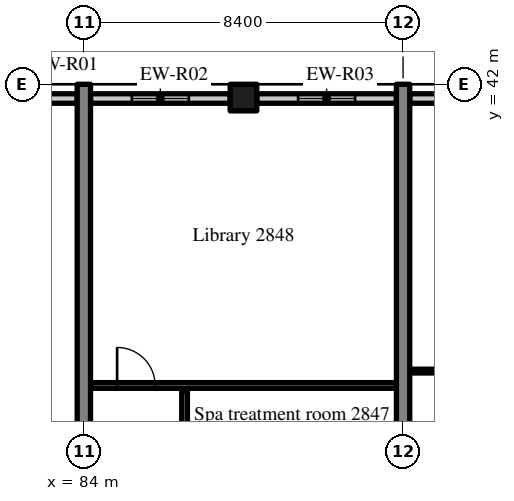
"""IFC4 building model, lengths in metres.
Left out: names, types, materials, properties, quantities, classifications, styles, units other than length and angle.
Written with IfcOpenShell. Run it as: python <this file> out.ifc"""

import sys

from ifc_helpers import new_model, si_unit, direction, frame, frame_2d, origin, origin_2d, place, context, subcontext, project, spatial, rectangle, extrude, source, transform, mapped, element, fill, save


model = new_model("IFC4")
c1 = context("Model", 3, precision=1e-05, world=origin(), true_north=direction((0.0, 1.0)))
c2 = subcontext(c1, "Body", "Model", "MODEL_VIEW")
j1 = project(units=[si_unit("LENGTHUNIT", "METRE"), si_unit("PLANEANGLEUNIT", "RADIAN")], contexts=[c1])
p1 = place(None, origin())
s1 = spatial("IfcSite", under=j1, at=p1, CompositionType="ELEMENT")
p2 = place(p1, origin())
s2 = spatial("IfcBuilding", under=s1, at=p2, CompositionType="ELEMENT")
p3 = place(p2, frame((0.0, 0.0, 118.0)))
s3 = spatial("IfcBuildingStorey", under=s2, at=p3, CompositionType="ELEMENT", Elevation=118.0)
m1 = source(origin(), c2, "Body", "SweptSolid", [
    extrude(rectangle(XDim=20.0, YDim=0.35, at=frame_2d((10.0, 0.0))), origin(), (0.0, 0.0, 1.0), 3.52),
])
for number, where, z_axis, x_axis in (
    (1, (84.0, 22.0, 0.0), (0.0, 0.0, 1.0), (0.0, 1.0, 0.0)),
    (2, (92.4, 22.0, 0.0), (0.0, 0.0, 1.0), (0.0, 1.0, 0.0)),
):
    element("IfcWall", number, at=place(p3, frame(where, z_axis=z_axis, x_axis=x_axis)), inside=s3, PredefinedType="SHEAR", context=c2, shape_type="MappedRepresentation", body=[
        mapped(m1, transform((0.0, 0.0, 0.0), scale=1.0)),
    ])
m2 = source(origin(), c2, "Body", "SweptSolid", [
    extrude(rectangle(XDim=0.7, YDim=0.7, at=origin_2d()), origin(), (0.0, 0.0, 1.0), 3.52),
])
p4 = place(p3, frame((88.2, 41.65, 0.0), z_axis=(0.0, 0.0, 1.0), x_axis=(1.0, 0.0, 0.0)))
e3 = element("IfcColumn", 3, at=p4, inside=s3, PredefinedType="COLUMN", context=c2, shape_type="MappedRepresentation", body=[
    mapped(m2, transform((0.0, 0.0, 0.0), scale=1.0)),
])
m3 = source(origin(), c2, "Body", "SweptSolid", [
    extrude(rectangle(XDim=1.683, YDim=0.25, at=frame_2d((0.841, 0.0))), origin(), (0.0, 0.0, 1.0), 2.82),
])
p5 = place(p3, frame((83.825, 41.625, 0.0), z_axis=(0.0, 0.0, 1.0), x_axis=(-1.0, 0.0, 0.0)))
e4 = element("IfcWall", 4, at=p5, inside=s3, PredefinedType="SOLIDWALL", context=c2, shape_type="MappedRepresentation", body=[
    mapped(m3, transform((0.0, 0.0, 0.0), scale=1.0)),
])
m4 = source(origin(), c2, "Body", "SweptSolid", [
    extrude(rectangle(XDim=3.675, YDim=0.25, at=frame_2d((1.837, 0.0))), origin(), (0.0, 0.0, 1.0), 2.82),
])
p6 = place(p3, frame((87.85, 41.625, 0.0), z_axis=(0.0, 0.0, 1.0), x_axis=(-1.0, 0.0, 0.0)))
e5 = element("IfcWall", 5, at=p6, inside=s3, PredefinedType="SOLIDWALL", context=c2, shape_type="MappedRepresentation", body=[
    mapped(m4, transform((0.0, 0.0, 0.0), scale=1.0)),
])
m5 = source(origin(), c2, "Body", "SweptSolid", [
    extrude(rectangle(XDim=1.5, YDim=1.5, at=frame_2d((0.75, 0.75))), frame((0.0, 0.135, 0.0), z_axis=(0.0, -1.0, 0.0), x_axis=(1.0, 0.0, 0.0)), (0.0, 0.0, 1.0), 0.27),
])
p7 = place(p6, frame((1.087, 0.0, 0.9)))
e6 = element("IfcOpeningElement", 6, at=p7, cuts=e5, PredefinedType="OPENING", context=c2, shape_type="MappedRepresentation", body=[
    mapped(m5, transform((0.0, 0.0, 0.0), scale=1.0)),
])
p8 = place(p3, frame((92.225, 41.625, 0.0), z_axis=(0.0, 0.0, 1.0), x_axis=(-1.0, 0.0, 0.0)))
e7 = element("IfcWall", 7, at=p8, inside=s3, PredefinedType="SOLIDWALL", context=c2, shape_type="MappedRepresentation", body=[
    mapped(m4, transform((0.0, 0.0, 0.0), scale=1.0)),
])
p9 = place(p8, frame((1.087, 0.0, 0.9)))
e8 = element("IfcOpeningElement", 8, at=p9, cuts=e7, PredefinedType="OPENING", context=c2, shape_type="MappedRepresentation", body=[
    mapped(m5, transform((0.0, 0.0, 0.0), scale=1.0)),
])
m6 = source(origin(), c2, "Body", "SweptSolid", [
    extrude(rectangle(XDim=4.07, YDim=0.25, at=frame_2d((2.035, 0.0))), origin(), (0.0, 0.0, 1.0), 2.82),
])
p10 = place(p3, frame((96.645, 41.625, 0.0), z_axis=(0.0, 0.0, 1.0), x_axis=(-1.0, 0.0, 0.0)))
e9 = element("IfcWall", 9, at=p10, inside=s3, PredefinedType="SOLIDWALL", context=c2, shape_type="MappedRepresentation", body=[
    mapped(m6, transform((0.0, 0.0, 0.0), scale=1.0)),
])
p11 = place(p10, frame((1.285, 0.0, 0.9)))
e10 = element("IfcOpeningElement", 10, at=p11, cuts=e9, PredefinedType="OPENING", context=c2, shape_type="MappedRepresentation", body=[
    mapped(m5, transform((0.0, 0.0, 0.0), scale=1.0)),
])
m7 = source(origin(), c2, "Body", "SweptSolid", [
    extrude(rectangle(XDim=4.45, YDim=0.15, at=frame_2d((2.225, 0.0))), origin(), (0.0, 0.0, 1.0), 3.52),
])
p12 = place(p3, frame((86.65, 29.475, 0.0), z_axis=(0.0, 0.0, 1.0), x_axis=(0.0, 1.0, 0.0)))
e11 = element("IfcWall", 11, at=p12, inside=s3, PredefinedType="PARTITIONING", context=c2, shape_type="MappedRepresentation", body=[
    mapped(m7, transform((0.0, 0.0, 0.0), scale=1.0)),
])
m8 = source(origin(), c2, "Body", "SweptSolid", [
    extrude(rectangle(XDim=1.0, YDim=2.1, at=frame_2d((0.5, 1.05))), frame((0.0, 0.085, 0.0), z_axis=(0.0, -1.0, 0.0), x_axis=(1.0, 0.0, 0.0)), (0.0, 0.0, 1.0), 0.17),
])
p13 = place(p12, frame((1.725, 0.0, 0.0)))
e12 = element("IfcOpeningElement", 12, at=p13, cuts=e11, PredefinedType="OPENING", context=c2, shape_type="MappedRepresentation", body=[
    mapped(m8, transform((0.0, 0.0, 0.0), scale=1.0)),
])
m9 = source(origin(), c2, "Body", "SweptSolid", [
    extrude(rectangle(XDim=8.05, YDim=0.15, at=frame_2d((4.025, 0.0))), origin(), (0.0, 0.0, 1.0), 3.52),
])
p14 = place(p3, frame((84.175, 34.075, 0.0), z_axis=(0.0, 0.0, 1.0), x_axis=(1.0, 0.0, 0.0)))
e13 = element("IfcWall", 13, at=p14, inside=s3, PredefinedType="PARTITIONING", context=c2, shape_type="MappedRepresentation", body=[
    mapped(m9, transform((0.0, 0.0, 0.0), scale=1.0)),
])
p15 = place(p14, frame((0.7, 0.0, 0.0)))
e14 = element("IfcOpeningElement", 14, at=p15, cuts=e13, PredefinedType="OPENING", context=c2, shape_type="MappedRepresentation", body=[
    mapped(m8, transform((0.0, 0.0, 0.0), scale=1.0)),
])
m10 = source(origin(), c2, "Body", "SweptSolid", [
    extrude(rectangle(XDim=7.875, YDim=0.1, at=frame_2d((3.938, 0.0))), origin(), (0.0, 0.0, 1.0), 3.52),
])
p16 = place(p3, frame((92.575, 34.453, 0.0), z_axis=(0.0, 0.0, 1.0), x_axis=(1.0, 0.0, 0.0)))
e15 = element("IfcWall", 15, at=p16, inside=s3, PredefinedType="PARTITIONING", context=c2, shape_type="MappedRepresentation", body=[
    mapped(m10, transform((0.0, 0.0, 0.0), scale=1.0)),
])
m11 = source(origin(), c2, "Body", "SweptSolid", [
    extrude(rectangle(XDim=1.8, YDim=2.1, at=frame_2d((0.9, 1.05))), frame((0.0, 0.06, 0.0), z_axis=(0.0, -1.0, 0.0), x_axis=(1.0, 0.0, 0.0)), (0.0, 0.0, 1.0), 0.12),
])
p17 = place(p16, frame((3.037, 0.0, 0.0)))
e16 = element("IfcOpeningElement", 16, at=p17, cuts=e15, PredefinedType="OPENING", context=c2, shape_type="MappedRepresentation", body=[
    mapped(m11, transform((0.0, 0.0, 0.0), scale=1.0)),
])
m12 = source(origin(), c2, "Body", "SweptSolid", [
    extrude(rectangle(XDim=1.5, YDim=1.5, at=frame_2d((0.75, 0.75))), frame((0.0, 0.03, 0.0), z_axis=(0.0, -1.0, 0.0), x_axis=(1.0, 0.0, 0.0)), (0.0, 0.0, 1.0), 0.06),
])
p18 = place(p7, origin())
e17 = element("IfcWindow", 17, at=p18, inside=s3, PartitioningType="SINGLE_PANEL", PredefinedType="WINDOW", context=c2, shape_type="MappedRepresentation", body=[
    mapped(m12, transform((0.0, 0.0, 0.0), scale=1.0)),
])
fill(e6, e17)
p19 = place(p9, origin())
e18 = element("IfcWindow", 18, at=p19, inside=s3, PartitioningType="SINGLE_PANEL", PredefinedType="WINDOW", context=c2, shape_type="MappedRepresentation", body=[
    mapped(m12, transform((0.0, 0.0, 0.0), scale=1.0)),
])
fill(e8, e18)
m13 = source(origin(), c2, "Body", "SweptSolid", [
    extrude(rectangle(XDim=1.0, YDim=2.1, at=frame_2d((0.5, 1.05))), frame((0.0, 0.025, 0.0), z_axis=(0.0, -1.0, 0.0), x_axis=(1.0, 0.0, 0.0)), (0.0, 0.0, 1.0), 0.05),
])
p20 = place(p15, origin())
e19 = element("IfcDoor", 19, at=p20, inside=s3, OperationType="SINGLE_SWING_LEFT", PredefinedType="DOOR", context=c2, shape_type="MappedRepresentation", body=[
    mapped(m13, transform((0.0, 0.0, 0.0), scale=1.0)),
])
fill(e14, e19)
save(model, sys.argv[1])
